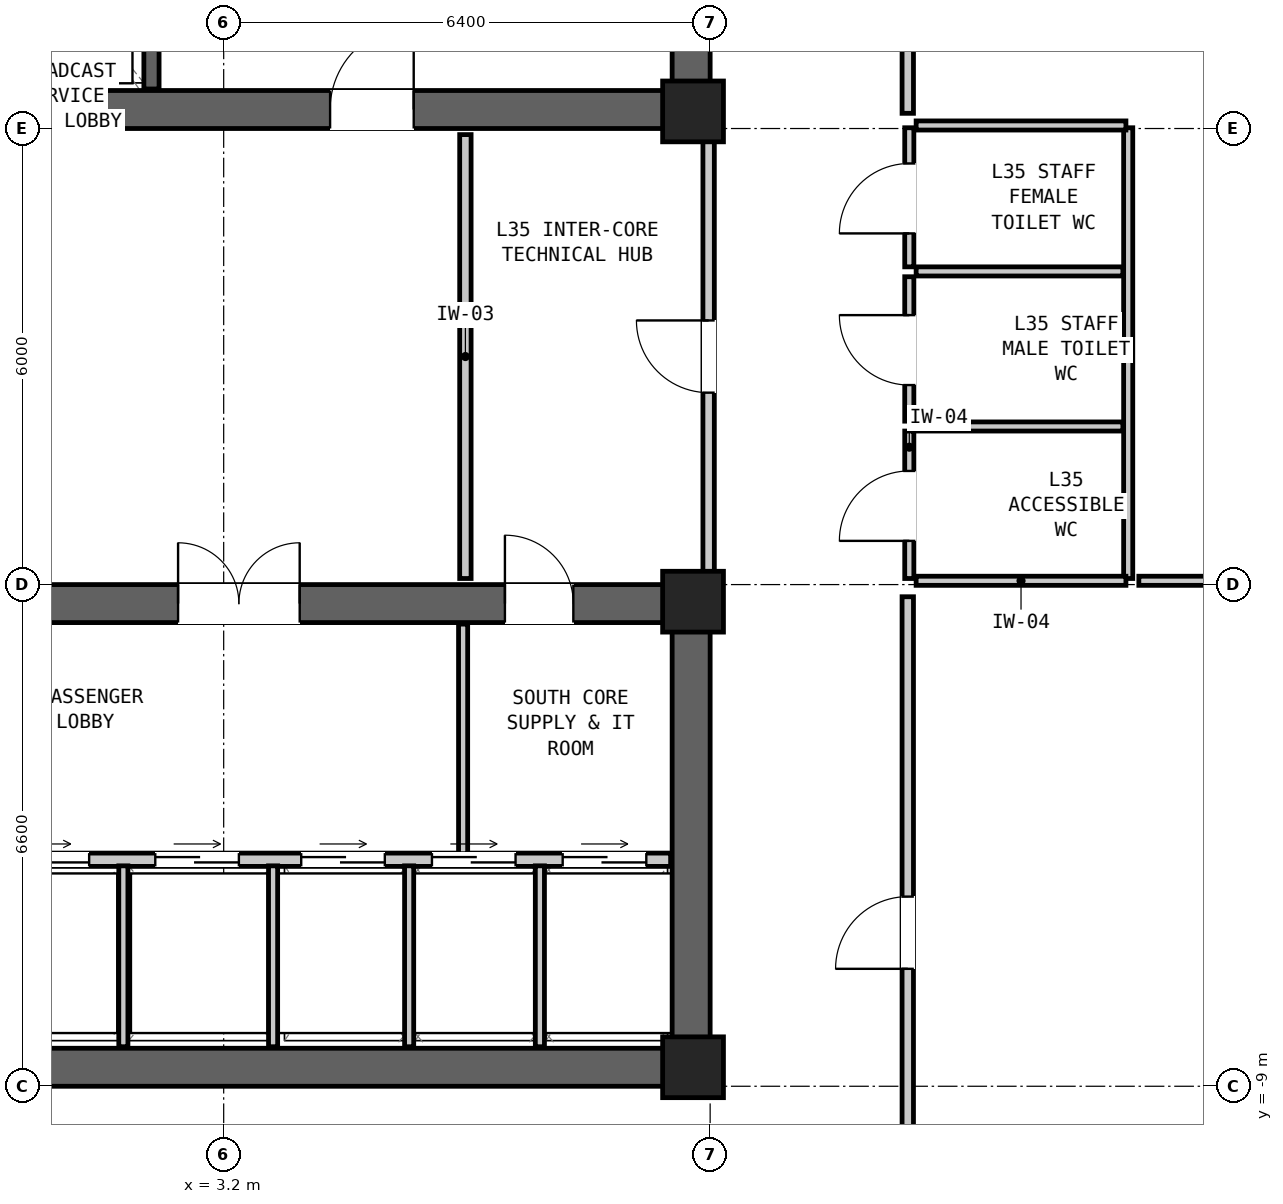
"""IFC4 building model, lengths in metres.
Left out: names, types, materials, properties, quantities, classifications, styles, units other than length and angle.
Written with IfcOpenShell. Run it as: python <this file> out.ifc"""

import sys

from ifc_helpers import new_model, si_unit, direction, frame, frame_2d, origin, origin_2d, place, context, subcontext, project, spatial, rectangle, extrude, element, fill, save


model = new_model("IFC4")
c1 = context("Model", 3, precision=1e-05, world=origin(), true_north=direction((0.0, 1.0)))
c2 = subcontext(c1, "Body", "Model", "MODEL_VIEW")
j1 = project(units=[si_unit("LENGTHUNIT", "METRE"), si_unit("PLANEANGLEUNIT", "RADIAN")], contexts=[c1])
p1 = place(None, origin())
s1 = spatial("IfcSite", under=j1, at=p1, CompositionType="ELEMENT")
p2 = place(p1, origin())
s2 = spatial("IfcBuilding", under=s1, at=p2, CompositionType="ELEMENT")
p3 = place(p2, frame((0.0, 0.0, 121.95)))
s3 = spatial("IfcBuildingStorey", under=s2, at=p3, CompositionType="ELEMENT", Elevation=121.95)
p4 = place(p3, frame((-9.6, 3.85, 0.0), z_axis=(0.0, 0.0, 1.0), x_axis=(1.0, 0.0, 0.0)))
e1 = element("IfcWall", 1, at=p4, inside=s3, PredefinedType="SHEAR", context=c2, shape_type="SweptSolid", body=[
    extrude(rectangle(XDim=19.2, YDim=0.5, at=frame_2d((9.6, 0.0))), origin(), (0.0, 0.0, 1.0), 3.05),
])
p5 = place(p4, frame((14.2, 0.0, 0.0)))
e2 = element("IfcOpeningElement", 2, at=p5, cuts=e1, PredefinedType="OPENING", context=c2, shape_type="SweptSolid", body=[
    extrude(rectangle(XDim=1.1, YDim=2.08, at=frame_2d((0.55, 1.04))), frame((0.0, 0.262, 0.0), z_axis=(0.0, -1.0, 0.0), x_axis=(1.0, 0.0, 0.0)), (0.0, 0.0, 1.0), 0.524),
])
p6 = place(p4, frame((8.2, 0.0, 0.0)))
e3 = element("IfcOpeningElement", 3, at=p6, cuts=e1, PredefinedType="OPENING", context=c2, shape_type="SweptSolid", body=[
    extrude(rectangle(XDim=1.15, YDim=2.1, at=frame_2d((0.575, 1.05))), frame((0.0, 0.262, 0.0), z_axis=(0.0, -1.0, 0.0), x_axis=(1.0, 0.0, 0.0)), (0.0, 0.0, 1.0), 0.524),
])
p7 = place(p4, frame((2.5, 0.0, 0.0)))
e4 = element("IfcOpeningElement", 4, at=p7, cuts=e1, PredefinedType="OPENING", context=c2, shape_type="SweptSolid", body=[
    extrude(rectangle(XDim=1.6, YDim=2.12, at=frame_2d((0.8, 1.06))), frame((0.0, 0.262, 0.0), z_axis=(0.0, -1.0, 0.0), x_axis=(1.0, 0.0, 0.0)), (0.0, 0.0, 1.0), 0.524),
])
p8 = place(p3, frame((9.35, 3.6, 0.0), z_axis=(0.0, 0.0, 1.0), x_axis=(0.0, 1.0, 0.0)))
e5 = element("IfcWall", 5, at=p8, inside=s3, PredefinedType="SHEAR", context=c2, shape_type="SweptSolid", body=[
    extrude(rectangle(XDim=6.6, YDim=0.5, at=frame_2d((3.3, 0.0))), origin(), (0.0, 0.0, 1.0), 3.05),
])
p9 = place(p3, frame((-9.6, -8.75, 0.0), z_axis=(0.0, 0.0, 1.0), x_axis=(1.0, 0.0, 0.0)))
e6 = element("IfcWall", 6, at=p9, inside=s3, PredefinedType="SHEAR", context=c2, shape_type="SweptSolid", body=[
    extrude(rectangle(XDim=19.2, YDim=0.5, at=frame_2d((9.6, 0.0))), origin(), (0.0, 0.0, 1.0), 3.05),
])
p10 = place(p3, frame((-9.6, -2.65, 0.0), z_axis=(0.0, 0.0, 1.0), x_axis=(1.0, 0.0, 0.0)))
e7 = element("IfcWall", 7, at=p10, inside=s3, PredefinedType="SHEAR", context=c2, shape_type="SweptSolid", body=[
    extrude(rectangle(XDim=19.2, YDim=0.5, at=frame_2d((9.6, 0.0))), origin(), (0.0, 0.0, 1.0), 3.05),
])
p11 = place(p10, frame((3.8, 0.0, 0.0)))
e8 = element("IfcOpeningElement", 8, at=p11, cuts=e7, PredefinedType="OPENING", context=c2, shape_type="SweptSolid", body=[
    extrude(rectangle(XDim=1.1, YDim=2.08, at=frame_2d((0.55, 1.04))), frame((0.0, 0.262, 0.0), z_axis=(0.0, -1.0, 0.0), x_axis=(1.0, 0.0, 0.0)), (0.0, 0.0, 1.0), 0.524),
])
p12 = place(p10, frame((12.2, 0.0, 0.0)))
e9 = element("IfcOpeningElement", 9, at=p12, cuts=e7, PredefinedType="OPENING", context=c2, shape_type="SweptSolid", body=[
    extrude(rectangle(XDim=1.6, YDim=2.12, at=frame_2d((0.8, 1.06))), frame((0.0, 0.262, 0.0), z_axis=(0.0, -1.0, 0.0), x_axis=(1.0, 0.0, 0.0)), (0.0, 0.0, 1.0), 0.524),
])
p13 = place(p10, frame((16.5, 0.0, 0.0)))
e10 = element("IfcOpeningElement", 10, at=p13, cuts=e7, PredefinedType="OPENING", context=c2, shape_type="SweptSolid", body=[
    extrude(rectangle(XDim=0.9, YDim=2.05, at=frame_2d((0.45, 1.025))), frame((0.0, 0.262, 0.0), z_axis=(0.0, -1.0, 0.0), x_axis=(1.0, 0.0, 0.0)), (0.0, 0.0, 1.0), 0.524),
])
p14 = place(p3, frame((9.35, -9.0, 0.0), z_axis=(0.0, 0.0, 1.0), x_axis=(0.0, 1.0, 0.0)))
e11 = element("IfcWall", 11, at=p14, inside=s3, PredefinedType="SHEAR", context=c2, shape_type="SweptSolid", body=[
    extrude(rectangle(XDim=6.6, YDim=0.5, at=frame_2d((3.3, 0.0))), origin(), (0.0, 0.0, 1.0), 3.05),
])
for number, where, z_axis, x_axis in (
    (12, (9.375, 3.825, 0.0), (0.0, 0.0, 1.0), (1.0, 0.0, 0.0)),
    (13, (9.375, -2.625, 0.0), (0.0, 0.0, 1.0), (1.0, 0.0, 0.0)),
    (14, (9.375, -8.75, 0.0), (0.0, 0.0, 1.0), (1.0, 0.0, 0.0)),
):
    element("IfcColumn", number, at=place(p3, frame(where, z_axis=z_axis, x_axis=x_axis)), inside=s3, PredefinedType="COLUMN", context=c2, shape_type="SweptSolid", body=[
        extrude(rectangle(XDim=0.8, YDim=0.8, at=origin_2d()), origin(), (0.0, 0.0, 1.0), 3.05),
    ])
p15 = place(p3, frame((2.25, 4.12, 0.0), z_axis=(0.0, 0.0, 1.0), x_axis=(0.0, 1.0, 0.0)))
e15 = element("IfcWall", 15, at=p15, inside=s3, PredefinedType="SHEAR", context=c2, shape_type="SweptSolid", body=[
    extrude(rectangle(XDim=5.56, YDim=0.2, at=frame_2d((2.78, 0.0))), origin(), (0.0, 0.0, 1.0), 2.83),
])
p16 = place(p15, frame((0.65, 0.0, 0.0)))
e16 = element("IfcOpeningElement", 16, at=p16, cuts=e15, PredefinedType="OPENING", context=c2, shape_type="SweptSolid", body=[
    extrude(rectangle(XDim=1.15, YDim=2.08, at=frame_2d((0.575, 1.04))), frame((0.0, 0.112, 0.0), z_axis=(0.0, -1.0, 0.0), x_axis=(1.0, 0.0, 0.0)), (0.0, 0.0, 1.0), 0.224),
])
p17 = place(p3, frame((0.0, -6.02, 0.0), z_axis=(0.0, 0.0, 1.0), x_axis=(1.0, 0.0, 0.0)))
e17 = element("IfcWall", 17, at=p17, inside=s3, PredefinedType="PARTITIONING", context=c2, shape_type="SweptSolid", body=[
    extrude(rectangle(XDim=9.08, YDim=0.175, at=frame_2d((4.54, 0.0))), origin(), (0.0, 0.0, 1.0), 2.83),
])
p18 = place(p17, frame((0.33, 0.0, 0.0)))
e18 = element("IfcOpeningElement", 18, at=p18, cuts=e17, PredefinedType="OPENING", context=c2, shape_type="SweptSolid", body=[
    extrude(rectangle(XDim=1.1, YDim=2.06, at=frame_2d((0.55, 1.03))), frame((0.0, 0.1, 0.0), z_axis=(0.0, -1.0, 0.0), x_axis=(1.0, 0.0, 0.0)), (0.0, 0.0, 1.0), 0.199),
])
p19 = place(p17, frame((2.3, 0.0, 0.0)))
e19 = element("IfcOpeningElement", 19, at=p19, cuts=e17, PredefinedType="OPENING", context=c2, shape_type="SweptSolid", body=[
    extrude(rectangle(XDim=1.1, YDim=2.06, at=frame_2d((0.55, 1.03))), frame((0.0, 0.1, 0.0), z_axis=(0.0, -1.0, 0.0), x_axis=(1.0, 0.0, 0.0)), (0.0, 0.0, 1.0), 0.199),
])
p20 = place(p17, frame((4.22, 0.0, 0.0)))
e20 = element("IfcOpeningElement", 20, at=p20, cuts=e17, PredefinedType="OPENING", context=c2, shape_type="SweptSolid", body=[
    extrude(rectangle(XDim=1.1, YDim=2.06, at=frame_2d((0.55, 1.03))), frame((0.0, 0.1, 0.0), z_axis=(0.0, -1.0, 0.0), x_axis=(1.0, 0.0, 0.0)), (0.0, 0.0, 1.0), 0.199),
])
p21 = place(p17, frame((5.94, 0.0, 0.0)))
e21 = element("IfcOpeningElement", 21, at=p21, cuts=e17, PredefinedType="OPENING", context=c2, shape_type="SweptSolid", body=[
    extrude(rectangle(XDim=1.1, YDim=2.06, at=frame_2d((0.55, 1.03))), frame((0.0, 0.1, 0.0), z_axis=(0.0, -1.0, 0.0), x_axis=(1.0, 0.0, 0.0)), (0.0, 0.0, 1.0), 0.199),
])
p22 = place(p17, frame((7.66, 0.0, 0.0)))
e22 = element("IfcOpeningElement", 22, at=p22, cuts=e17, PredefinedType="OPENING", context=c2, shape_type="SweptSolid", body=[
    extrude(rectangle(XDim=1.1, YDim=2.06, at=frame_2d((0.55, 1.03))), frame((0.0, 0.1, 0.0), z_axis=(0.0, -1.0, 0.0), x_axis=(1.0, 0.0, 0.0)), (0.0, 0.0, 1.0), 0.199),
])
for number, where, z_axis, x_axis in (
    (23, (1.88, -8.48, 0.0), (0.0, 0.0, 1.0), (0.0, 1.0, 0.0)),
    (24, (3.85, -8.48, 0.0), (0.0, 0.0, 1.0), (0.0, 1.0, 0.0)),
    (25, (5.64, -8.48, 0.0), (0.0, 0.0, 1.0), (0.0, 1.0, 0.0)),
    (26, (7.36, -8.48, 0.0), (0.0, 0.0, 1.0), (0.0, 1.0, 0.0)),
):
    element("IfcWall", number, at=place(p3, frame(where, z_axis=z_axis, x_axis=x_axis)), inside=s3, PredefinedType="PARTITIONING", context=c2, shape_type="SweptSolid", body=[
        extrude(rectangle(XDim=2.38, YDim=0.12, at=frame_2d((1.19, 0.0))), origin(), (0.0, 0.0, 1.0), 2.83),
    ])
p23 = place(p3, frame((6.35, -5.94, 0.0), z_axis=(0.0, 0.0, 1.0), x_axis=(0.0, 1.0, 0.0)))
e27 = element("IfcWall", 27, at=p23, inside=s3, PredefinedType="PARTITIONING", context=c2, shape_type="SweptSolid", body=[
    extrude(rectangle(XDim=3.02, YDim=0.12, at=frame_2d((1.51, 0.0))), origin(), (0.0, 0.0, 1.0), 2.83),
])
p24 = place(p3, frame((6.38, -2.32, 0.0), z_axis=(0.0, 0.0, 1.0), x_axis=(0.0, 1.0, 0.0)))
e28 = element("IfcWall", 28, at=p24, inside=s3, PredefinedType="PARTITIONING", context=c2, shape_type="SweptSolid", body=[
    extrude(rectangle(XDim=5.84, YDim=0.15, at=frame_2d((2.92, 0.0))), origin(), (0.0, 0.0, 1.0), 2.198),
])
p25 = place(p3, frame((9.58, -2.32, 0.0), z_axis=(0.0, 0.0, 1.0), x_axis=(0.0, 1.0, 0.0)))
e29 = element("IfcWall", 29, at=p25, inside=s3, PredefinedType="PARTITIONING", context=c2, shape_type="SweptSolid", body=[
    extrude(rectangle(XDim=5.84, YDim=0.15, at=frame_2d((2.92, 0.0))), origin(), (0.0, 0.0, 1.0), 2.198),
])
p26 = place(p25, frame((2.445, 0.0, 0.0)))
e30 = element("IfcOpeningElement", 30, at=p26, cuts=e29, PredefinedType="OPENING", context=c2, shape_type="SweptSolid", body=[
    extrude(rectangle(XDim=0.95, YDim=2.1, at=frame_2d((0.475, 1.05))), frame((0.0, 0.087, 0.0), z_axis=(0.0, -1.0, 0.0), x_axis=(1.0, 0.0, 0.0)), (0.0, 0.0, 1.0), 0.174),
])
p27 = place(p3, frame((12.22, -2.32, 0.0), z_axis=(0.0, 0.0, 1.0), x_axis=(0.0, 1.0, 0.0)))
e31 = element("IfcWall", 31, at=p27, inside=s3, PredefinedType="PARTITIONING", context=c2, shape_type="SweptSolid", body=[
    extrude(rectangle(XDim=1.94, YDim=0.12, at=frame_2d((0.97, 0.0))), origin(), (0.0, 0.0, 1.0), 2.83),
])
p28 = place(p27, frame((0.495, 0.0, 0.0)))
e32 = element("IfcOpeningElement", 32, at=p28, cuts=e31, PredefinedType="OPENING", context=c2, shape_type="SweptSolid", body=[
    extrude(rectangle(XDim=0.92, YDim=2.1, at=frame_2d((0.46, 1.05))), frame((0.0, 0.072, 0.0), z_axis=(0.0, -1.0, 0.0), x_axis=(1.0, 0.0, 0.0)), (0.0, 0.0, 1.0), 0.144),
])
p29 = place(p3, frame((12.22, -0.25, 0.0), z_axis=(0.0, 0.0, 1.0), x_axis=(0.0, 1.0, 0.0)))
e33 = element("IfcWall", 33, at=p29, inside=s3, PredefinedType="PARTITIONING", context=c2, shape_type="SweptSolid", body=[
    extrude(rectangle(XDim=1.9, YDim=0.12, at=frame_2d((0.95, 0.0))), origin(), (0.0, 0.0, 1.0), 2.83),
])
p30 = place(p29, frame((0.475, 0.0, 0.0)))
e34 = element("IfcOpeningElement", 34, at=p30, cuts=e33, PredefinedType="OPENING", context=c2, shape_type="SweptSolid", body=[
    extrude(rectangle(XDim=0.92, YDim=2.1, at=frame_2d((0.46, 1.05))), frame((0.0, 0.072, 0.0), z_axis=(0.0, -1.0, 0.0), x_axis=(1.0, 0.0, 0.0)), (0.0, 0.0, 1.0), 0.144),
])
p31 = place(p3, frame((12.22, 1.78, 0.0), z_axis=(0.0, 0.0, 1.0), x_axis=(0.0, 1.0, 0.0)))
e35 = element("IfcWall", 35, at=p31, inside=s3, PredefinedType="PARTITIONING", context=c2, shape_type="SweptSolid", body=[
    extrude(rectangle(XDim=1.83, YDim=0.12, at=frame_2d((0.915, 0.0))), origin(), (0.0, 0.0, 1.0), 2.83),
])
p32 = place(p31, frame((0.44, 0.0, 0.0)))
e36 = element("IfcOpeningElement", 36, at=p32, cuts=e35, PredefinedType="OPENING", context=c2, shape_type="SweptSolid", body=[
    extrude(rectangle(XDim=0.92, YDim=2.1, at=frame_2d((0.46, 1.05))), frame((0.0, 0.072, 0.0), z_axis=(0.0, -1.0, 0.0), x_axis=(1.0, 0.0, 0.0)), (0.0, 0.0, 1.0), 0.144),
])
p33 = place(p3, frame((15.1, -2.32, 0.0), z_axis=(0.0, 0.0, 1.0), x_axis=(0.0, 1.0, 0.0)))
e37 = element("IfcWall", 37, at=p33, inside=s3, PredefinedType="PARTITIONING", context=c2, shape_type="SweptSolid", body=[
    extrude(rectangle(XDim=5.93, YDim=0.12, at=frame_2d((2.965, 0.0))), origin(), (0.0, 0.0, 1.0), 2.83),
])
for number, where, z_axis, x_axis in (
    (38, (12.31, -2.35, 0.0), (0.0, 0.0, 1.0), (1.0, 0.0, 0.0)),
    (39, (12.31, 3.64, 0.0), (0.0, 0.0, 1.0), (1.0, 0.0, 0.0)),
):
    element("IfcWall", number, at=place(p3, frame(where, z_axis=z_axis, x_axis=x_axis)), inside=s3, PredefinedType="PARTITIONING", context=c2, shape_type="SweptSolid", body=[
        extrude(rectangle(XDim=2.76, YDim=0.12, at=frame_2d((1.38, 0.0))), origin(), (0.0, 0.0, 1.0), 1.883),
    ])
for number, where, z_axis, x_axis in (
    (40, (12.31, -0.32, 0.0), (0.0, 0.0, 1.0), (1.0, 0.0, 0.0)),
    (41, (12.31, 1.72, 0.0), (0.0, 0.0, 1.0), (1.0, 0.0, 0.0)),
):
    element("IfcWall", number, at=place(p3, frame(where, z_axis=z_axis, x_axis=x_axis)), inside=s3, PredefinedType="PARTITIONING", context=c2, shape_type="SweptSolid", body=[
        extrude(rectangle(XDim=2.72, YDim=0.12, at=frame_2d((1.36, 0.0))), origin(), (0.0, 0.0, 1.0), 2.83),
    ])
p34 = place(p3, frame((15.24, -2.35, 0.0), z_axis=(0.0, 0.0, 1.0), x_axis=(1.0, 0.0, 0.0)))
e42 = element("IfcWall", 42, at=p34, inside=s3, PredefinedType="PARTITIONING", context=c2, shape_type="SweptSolid", body=[
    extrude(rectangle(XDim=9.748, YDim=0.12, at=frame_2d((4.874, 0.0))), origin(), (0.0, 0.0, 1.0), 1.883),
])
p35 = place(p3, frame((12.2, -11.4, 0.0), z_axis=(0.0, 0.0, 1.0), x_axis=(0.0, 1.0, 0.0)))
e43 = element("IfcWall", 43, at=p35, inside=s3, PredefinedType="PARTITIONING", context=c2, shape_type="SweptSolid", body=[
    extrude(rectangle(XDim=8.84, YDim=0.15, at=frame_2d((4.42, 0.0))), origin(), (0.0, 0.0, 1.0), 2.83),
])
p36 = place(p35, frame((3.945, 0.0, 0.0)))
e44 = element("IfcOpeningElement", 44, at=p36, cuts=e43, PredefinedType="OPENING", context=c2, shape_type="SweptSolid", body=[
    extrude(rectangle(XDim=0.95, YDim=2.1, at=frame_2d((0.475, 1.05))), frame((0.0, 0.087, 0.0), z_axis=(0.0, -1.0, 0.0), x_axis=(1.0, 0.0, 0.0)), (0.0, 0.0, 1.0), 0.174),
])
p37 = place(p3, frame((12.2, 3.8, 0.0), z_axis=(0.0, 0.0, 1.0), x_axis=(0.0, 1.0, 0.0)))
e45 = element("IfcWall", 45, at=p37, inside=s3, PredefinedType="PARTITIONING", context=c2, shape_type="SweptSolid", body=[
    extrude(rectangle(XDim=8.8, YDim=0.15, at=frame_2d((4.4, 0.0))), origin(), (0.0, 0.0, 1.0), 2.83),
])
p38 = place(p37, frame((3.925, 0.0, 0.0)))
e46 = element("IfcOpeningElement", 46, at=p38, cuts=e45, PredefinedType="OPENING", context=c2, shape_type="SweptSolid", body=[
    extrude(rectangle(XDim=0.95, YDim=2.1, at=frame_2d((0.475, 1.05))), frame((0.0, 0.087, 0.0), z_axis=(0.0, -1.0, 0.0), x_axis=(1.0, 0.0, 0.0)), (0.0, 0.0, 1.0), 0.174),
])
p39 = place(p5, origin())
e47 = element("IfcDoor", 47, at=p39, inside=s3, OperationType="SINGLE_SWING_RIGHT", PredefinedType="DOOR", context=c2, shape_type="SweptSolid", body=[
    extrude(rectangle(XDim=1.1, YDim=2.08, at=frame_2d((0.55, 1.04))), frame((0.0, 0.025, 0.0), z_axis=(0.0, -1.0, 0.0), x_axis=(1.0, 0.0, 0.0)), (0.0, 0.0, 1.0), 0.05),
])
fill(e2, e47)
p40 = place(p18, origin())
e48 = element("IfcDoor", 48, at=p40, inside=s3, OperationType="DOUBLE_DOOR_SLIDING", PredefinedType="DOOR", context=c2, shape_type="SweptSolid", body=[
    extrude(rectangle(XDim=1.1, YDim=2.06, at=frame_2d((0.55, 1.03))), frame((0.0, 0.025, 0.0), z_axis=(0.0, -1.0, 0.0), x_axis=(1.0, 0.0, 0.0)), (0.0, 0.0, 1.0), 0.05),
])
fill(e18, e48)
p41 = place(p19, origin())
e49 = element("IfcDoor", 49, at=p41, inside=s3, OperationType="DOUBLE_DOOR_SLIDING", PredefinedType="DOOR", context=c2, shape_type="SweptSolid", body=[
    extrude(rectangle(XDim=1.1, YDim=2.06, at=frame_2d((0.55, 1.03))), frame((0.0, 0.025, 0.0), z_axis=(0.0, -1.0, 0.0), x_axis=(1.0, 0.0, 0.0)), (0.0, 0.0, 1.0), 0.05),
])
fill(e19, e49)
p42 = place(p12, origin())
e50 = element("IfcDoor", 50, at=p42, inside=s3, OperationType="DOUBLE_DOOR_SINGLE_SWING", PredefinedType="DOOR", context=c2, shape_type="SweptSolid", body=[
    extrude(rectangle(XDim=1.6, YDim=2.12, at=frame_2d((0.8, 1.06))), frame((0.0, 0.025, 0.0), z_axis=(0.0, -1.0, 0.0), x_axis=(1.0, 0.0, 0.0)), (0.0, 0.0, 1.0), 0.05),
])
fill(e9, e50)
p43 = place(p13, origin())
e51 = element("IfcDoor", 51, at=p43, inside=s3, OperationType="SINGLE_SWING_LEFT", PredefinedType="DOOR", context=c2, shape_type="SweptSolid", body=[
    extrude(rectangle(XDim=0.9, YDim=2.05, at=frame_2d((0.45, 1.025))), frame((0.0, 0.025, 0.0), z_axis=(0.0, -1.0, 0.0), x_axis=(1.0, 0.0, 0.0)), (0.0, 0.0, 1.0), 0.05),
])
fill(e10, e51)
p44 = place(p26, origin())
e52 = element("IfcDoor", 52, at=p44, inside=s3, OperationType="SINGLE_SWING_RIGHT", PredefinedType="DOOR", context=c2, shape_type="SweptSolid", body=[
    extrude(rectangle(XDim=0.95, YDim=2.1, at=frame_2d((0.475, 1.05))), frame((0.0, 0.025, 0.0), z_axis=(0.0, -1.0, 0.0), x_axis=(1.0, 0.0, 0.0)), (0.0, 0.0, 1.0), 0.05),
])
fill(e30, e52)
p45 = place(p28, origin())
e53 = element("IfcDoor", 53, at=p45, inside=s3, OperationType="SINGLE_SWING_LEFT", PredefinedType="DOOR", context=c2, shape_type="SweptSolid", body=[
    extrude(rectangle(XDim=0.92, YDim=2.1, at=frame_2d((0.46, 1.05))), frame((0.0, 0.025, 0.0), z_axis=(0.0, -1.0, 0.0), x_axis=(1.0, 0.0, 0.0)), (0.0, 0.0, 1.0), 0.05),
])
fill(e32, e53)
p46 = place(p30, origin())
e54 = element("IfcDoor", 54, at=p46, inside=s3, OperationType="SINGLE_SWING_RIGHT", PredefinedType="DOOR", context=c2, shape_type="SweptSolid", body=[
    extrude(rectangle(XDim=0.92, YDim=2.1, at=frame_2d((0.46, 1.05))), frame((0.0, 0.025, 0.0), z_axis=(0.0, -1.0, 0.0), x_axis=(1.0, 0.0, 0.0)), (0.0, 0.0, 1.0), 0.05),
])
fill(e34, e54)
p47 = place(p32, origin())
e55 = element("IfcDoor", 55, at=p47, inside=s3, OperationType="SINGLE_SWING_LEFT", PredefinedType="DOOR", context=c2, shape_type="SweptSolid", body=[
    extrude(rectangle(XDim=0.92, YDim=2.1, at=frame_2d((0.46, 1.05))), frame((0.0, 0.025, 0.0), z_axis=(0.0, -1.0, 0.0), x_axis=(1.0, 0.0, 0.0)), (0.0, 0.0, 1.0), 0.05),
])
fill(e36, e55)
p48 = place(p36, origin())
e56 = element("IfcDoor", 56, at=p48, inside=s3, OperationType="SINGLE_SWING_LEFT", PredefinedType="DOOR", context=c2, shape_type="SweptSolid", body=[
    extrude(rectangle(XDim=0.95, YDim=2.1, at=frame_2d((0.475, 1.05))), frame((0.0, 0.025, 0.0), z_axis=(0.0, -1.0, 0.0), x_axis=(1.0, 0.0, 0.0)), (0.0, 0.0, 1.0), 0.05),
])
fill(e44, e56)
p49 = place(p20, origin())
e57 = element("IfcDoor", 57, at=p49, inside=s3, OperationType="DOUBLE_DOOR_SLIDING", PredefinedType="DOOR", context=c2, shape_type="SweptSolid", body=[
    extrude(rectangle(XDim=1.1, YDim=2.06, at=frame_2d((0.55, 1.03))), frame((0.0, 0.025, 0.0), z_axis=(0.0, -1.0, 0.0), x_axis=(1.0, 0.0, 0.0)), (0.0, 0.0, 1.0), 0.05),
])
fill(e20, e57)
p50 = place(p21, origin())
e58 = element("IfcDoor", 58, at=p50, inside=s3, OperationType="DOUBLE_DOOR_SLIDING", PredefinedType="DOOR", context=c2, shape_type="SweptSolid", body=[
    extrude(rectangle(XDim=1.1, YDim=2.06, at=frame_2d((0.55, 1.03))), frame((0.0, 0.025, 0.0), z_axis=(0.0, -1.0, 0.0), x_axis=(1.0, 0.0, 0.0)), (0.0, 0.0, 1.0), 0.05),
])
fill(e21, e58)
p51 = place(p22, origin())
e59 = element("IfcDoor", 59, at=p51, inside=s3, OperationType="DOUBLE_DOOR_SLIDING", PredefinedType="DOOR", context=c2, shape_type="SweptSolid", body=[
    extrude(rectangle(XDim=1.1, YDim=2.06, at=frame_2d((0.55, 1.03))), frame((0.0, 0.025, 0.0), z_axis=(0.0, -1.0, 0.0), x_axis=(1.0, 0.0, 0.0)), (0.0, 0.0, 1.0), 0.05),
])
fill(e22, e59)
save(model, sys.argv[1])
